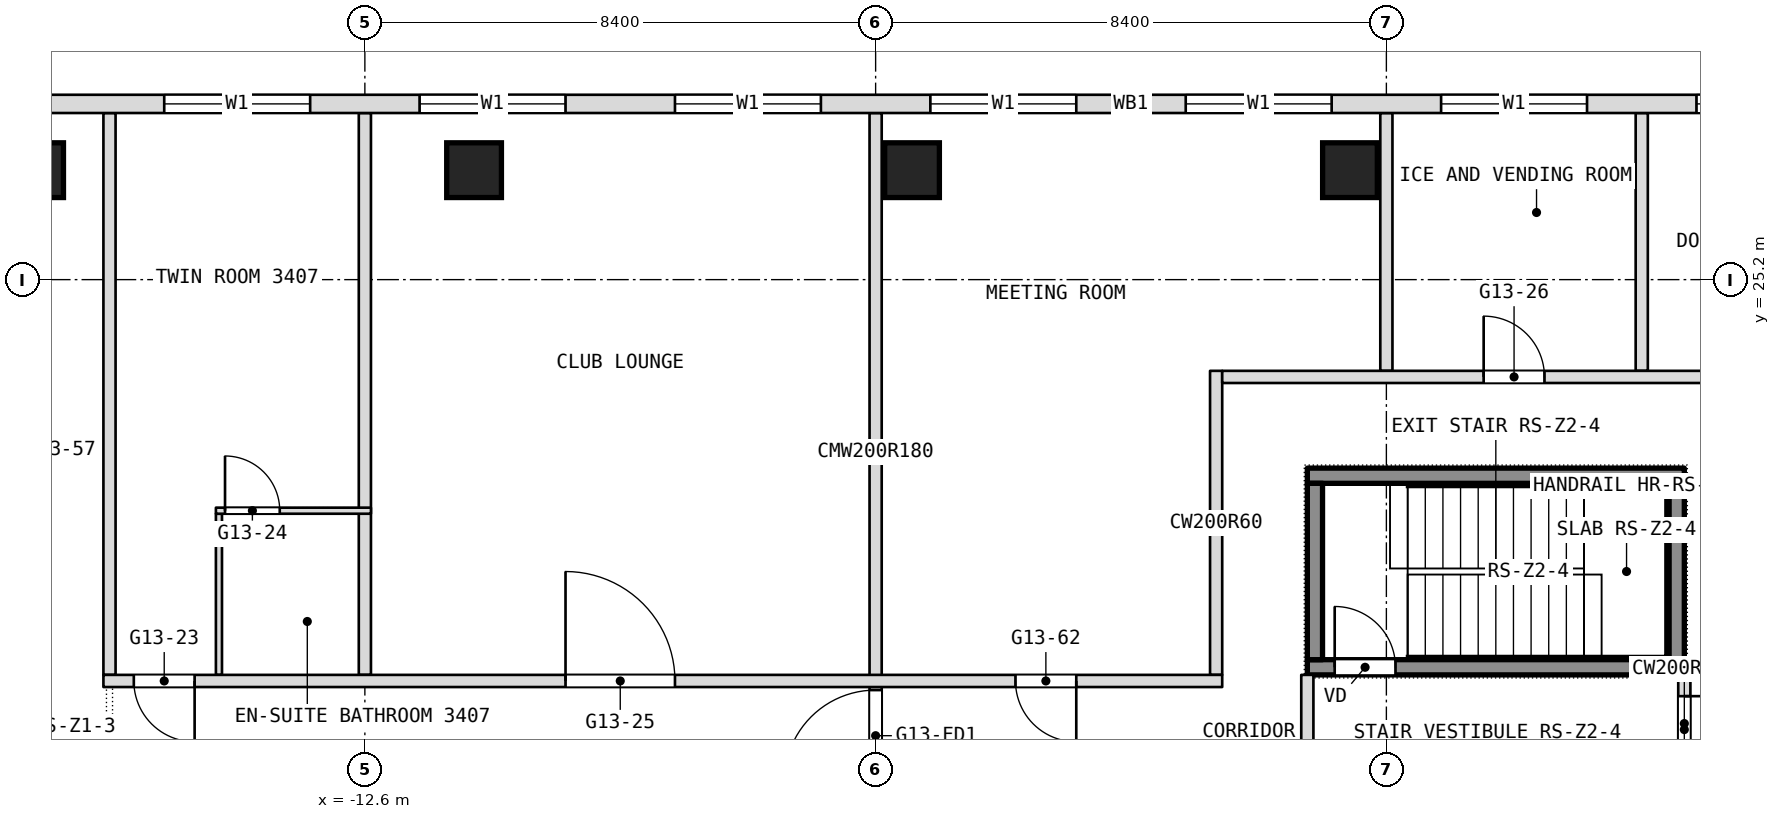
"""IFC4 building model, lengths in metres.
Left out: names, types, materials, properties, quantities, classifications, styles, units other than length and angle.
Written with IfcOpenShell. Run it as: python <this file> out.ifc"""

import sys

from ifc_helpers import new_model, si_unit, direction, frame, frame_2d, origin, origin_2d, place, context, subcontext, project, spatial, rectangle, extrude, element, fill, save


model = new_model("IFC4")
c1 = context("Model", 3, precision=1e-05, world=origin(), true_north=direction((0.0, 1.0)))
c2 = subcontext(c1, "Body", "Model", "MODEL_VIEW")
j1 = project(units=[si_unit("LENGTHUNIT", "METRE"), si_unit("PLANEANGLEUNIT", "RADIAN")], contexts=[c1])
p1 = place(None, origin())
s1 = spatial("IfcSite", under=j1, at=p1, CompositionType="ELEMENT")
p2 = place(p1, origin())
s2 = spatial("IfcBuilding", under=s1, at=p2, CompositionType="ELEMENT")
p3 = place(p2, frame((0.0, 0.0, 148.1)))
s3 = spatial("IfcBuildingStorey", under=s2, at=p3, CompositionType="ELEMENT", Elevation=148.1)
for number, where, z_axis, x_axis in (
    (1, (-18.007, 27.0, 0.0), (0.0, 0.0, 1.0), (1.0, 0.0, 0.0)),
    (2, (-10.804, 27.0, 0.0), (0.0, 0.0, 1.0), (1.0, 0.0, 0.0)),
    (3, (-3.601, 27.0, 0.0), (0.0, 0.0, 1.0), (1.0, 0.0, 0.0)),
    (4, (3.601, 27.0, 0.0), (0.0, 0.0, 1.0), (1.0, 0.0, 0.0)),
):
    element("IfcColumn", number, at=place(p3, frame(where, z_axis=z_axis, x_axis=x_axis)), inside=s3, PredefinedType="COLUMN", context=c2, shape_type="SweptSolid", body=[
        extrude(rectangle(XDim=0.9, YDim=0.9, at=origin_2d()), origin(), (0.0, 0.0, 1.0), 3.6),
    ])
p4 = place(p3, frame((9.1, 16.9, 0.0), z_axis=(0.0, 0.0, 1.0), x_axis=(0.0, 1.0, 0.0)))
e5 = element("IfcWall", 5, at=p4, inside=s3, PredefinedType="PARTITIONING", context=c2, shape_type="SweptSolid", body=[
    extrude(rectangle(XDim=1.8, YDim=0.2, at=frame_2d((0.9, 0.0))), origin(), (0.0, 0.0, 1.0), 3.34),
])
p5 = place(p4, frame((0.55, 0.0, 0.0)))
e6 = element("IfcOpeningElement", 6, at=p5, cuts=e5, PredefinedType="OPENING", context=c2, shape_type="SweptSolid", body=[
    extrude(rectangle(XDim=0.9, YDim=2.1, at=frame_2d((0.45, 1.05))), frame((0.0, 0.1, 0.0), z_axis=(0.0, -1.0, 0.0), x_axis=(1.0, 0.0, 0.0)), (0.0, 0.0, 1.0), 0.2),
])
for number, where, z_axis, x_axis in (
    (7, (8.4, 23.7, 0.0), (0.0, 0.0, 1.0), (0.0, 1.0, 0.0)),
    (8, (4.2, 23.7, 0.0), (0.0, 0.0, 1.0), (0.0, 1.0, 0.0)),
):
    element("IfcWall", number, at=place(p3, frame(where, z_axis=z_axis, x_axis=x_axis)), inside=s3, PredefinedType="PARTITIONING", context=c2, shape_type="SweptSolid", body=[
        extrude(rectangle(XDim=4.24, YDim=0.2, at=frame_2d((2.12, 0.0))), origin(), (0.0, 0.0, 1.0), 3.34),
    ])
p6 = place(p3, frame((2.9, 16.9, 0.0), z_axis=(0.0, 0.0, 1.0), x_axis=(0.0, 1.0, 0.0)))
e9 = element("IfcWall", 9, at=p6, inside=s3, PredefinedType="PARTITIONING", context=c2, shape_type="SweptSolid", body=[
    extrude(rectangle(XDim=1.8, YDim=0.2, at=frame_2d((0.9, 0.0))), origin(), (0.0, 0.0, 1.0), 3.34),
])
p7 = place(p3, frame((1.4, 18.7, 0.0), z_axis=(0.0, 0.0, 1.0), x_axis=(0.0, 1.0, 0.0)))
e10 = element("IfcWall", 10, at=p7, inside=s3, PredefinedType="PARTITIONING", context=c2, shape_type="SweptSolid", body=[
    extrude(rectangle(XDim=5.0, YDim=0.2, at=frame_2d((2.5, 0.0))), origin(), (0.0, 0.0, 1.0), 3.34),
])
p8 = place(p3, frame((-4.2, 16.8, 0.0), z_axis=(0.0, 0.0, 1.0), x_axis=(0.0, 1.0, 0.0)))
e11 = element("IfcWall", 11, at=p8, inside=s3, PredefinedType="PARTITIONING", context=c2, shape_type="SweptSolid", body=[
    extrude(rectangle(XDim=11.14, YDim=0.2, at=frame_2d((5.57, 0.0))), origin(), (0.0, 0.0, 1.0), 3.34),
])
p9 = place(p8, frame((0.15, 0.0, 0.0)))
e12 = element("IfcOpeningElement", 12, at=p9, cuts=e11, PredefinedType="OPENING", context=c2, shape_type="SweptSolid", body=[
    extrude(rectangle(XDim=1.5, YDim=2.1, at=frame_2d((0.75, 1.05))), frame((0.0, 0.1, 0.0), z_axis=(0.0, -1.0, 0.0), x_axis=(1.0, 0.0, 0.0)), (0.0, 0.0, 1.0), 0.2),
])
p10 = place(p3, frame((-12.6, 18.7, 0.0), z_axis=(0.0, 0.0, 1.0), x_axis=(0.0, 1.0, 0.0)))
e13 = element("IfcWall", 13, at=p10, inside=s3, PredefinedType="PARTITIONING", context=c2, shape_type="SweptSolid", body=[
    extrude(rectangle(XDim=9.24, YDim=0.2, at=frame_2d((4.62, 0.0))), origin(), (0.0, 0.0, 1.0), 3.34),
])
p11 = place(p3, frame((-15.0, 18.7, 0.0), z_axis=(0.0, 0.0, 1.0), x_axis=(0.0, 1.0, 0.0)))
e14 = element("IfcWall", 14, at=p11, inside=s3, PredefinedType="PARTITIONING", context=c2, shape_type="SweptSolid", body=[
    extrude(rectangle(XDim=2.65, YDim=0.1, at=frame_2d((1.325, 0.0))), origin(), (0.0, 0.0, 1.0), 3.34),
])
p12 = place(p3, frame((-16.8, 18.7, 0.0), z_axis=(0.0, 0.0, 1.0), x_axis=(0.0, 1.0, 0.0)))
e15 = element("IfcWall", 15, at=p12, inside=s3, PredefinedType="PARTITIONING", context=c2, shape_type="SweptSolid", body=[
    extrude(rectangle(XDim=9.24, YDim=0.2, at=frame_2d((4.62, 0.0))), origin(), (0.0, 0.0, 1.0), 3.34),
])
p13 = place(p3, frame((-16.9, 18.6, 0.0), z_axis=(0.0, 0.0, 1.0), x_axis=(1.0, 0.0, 0.0)))
e16 = element("IfcWall", 16, at=p13, inside=s3, PredefinedType="PARTITIONING", context=c2, shape_type="SweptSolid", body=[
    extrude(rectangle(XDim=18.4, YDim=0.2, at=frame_2d((9.2, 0.0))), origin(), (0.0, 0.0, 1.0), 3.34),
])
p14 = place(p13, frame((0.5, 0.0, 0.0)))
e17 = element("IfcOpeningElement", 17, at=p14, cuts=e16, PredefinedType="OPENING", context=c2, shape_type="SweptSolid", body=[
    extrude(rectangle(XDim=1.0, YDim=2.1, at=frame_2d((0.5, 1.05))), frame((0.0, 0.1, 0.0), z_axis=(0.0, -1.0, 0.0), x_axis=(1.0, 0.0, 0.0)), (0.0, 0.0, 1.0), 0.2),
])
p15 = place(p13, frame((7.6, 0.0, 0.0)))
e18 = element("IfcOpeningElement", 18, at=p15, cuts=e16, PredefinedType="OPENING", context=c2, shape_type="SweptSolid", body=[
    extrude(rectangle(XDim=1.8, YDim=2.1, at=frame_2d((0.9, 1.05))), frame((0.0, 0.1, 0.0), z_axis=(0.0, -1.0, 0.0), x_axis=(1.0, 0.0, 0.0)), (0.0, 0.0, 1.0), 0.2),
])
p16 = place(p13, frame((15.0, 0.0, 0.0)))
e19 = element("IfcOpeningElement", 19, at=p16, cuts=e16, PredefinedType="OPENING", context=c2, shape_type="SweptSolid", body=[
    extrude(rectangle(XDim=1.0, YDim=2.1, at=frame_2d((0.5, 1.05))), frame((0.0, 0.1, 0.0), z_axis=(0.0, -1.0, 0.0), x_axis=(1.0, 0.0, 0.0)), (0.0, 0.0, 1.0), 0.2),
])
p17 = place(p3, frame((-15.05, 21.4, 0.0), z_axis=(0.0, 0.0, 1.0), x_axis=(1.0, 0.0, 0.0)))
e20 = element("IfcWall", 20, at=p17, inside=s3, PredefinedType="PARTITIONING", context=c2, shape_type="SweptSolid", body=[
    extrude(rectangle(XDim=2.55, YDim=0.1, at=frame_2d((1.275, 0.0))), origin(), (0.0, 0.0, 1.0), 3.34),
])
p18 = place(p17, frame((0.15, 0.0, 0.0)))
e21 = element("IfcOpeningElement", 21, at=p18, cuts=e20, PredefinedType="OPENING", context=c2, shape_type="SweptSolid", body=[
    extrude(rectangle(XDim=0.9, YDim=2.1, at=frame_2d((0.45, 1.05))), frame((0.0, 0.05, 0.0), z_axis=(0.0, -1.0, 0.0), x_axis=(1.0, 0.0, 0.0)), (0.0, 0.0, 1.0), 0.1),
])
p19 = place(p3, frame((1.5, 23.6, 0.0), z_axis=(0.0, 0.0, 1.0), x_axis=(1.0, 0.0, 0.0)))
e22 = element("IfcWall", 22, at=p19, inside=s3, PredefinedType="PARTITIONING", context=c2, shape_type="SweptSolid", body=[
    extrude(rectangle(XDim=9.2, YDim=0.2, at=frame_2d((4.6, 0.0))), origin(), (0.0, 0.0, 1.0), 3.34),
])
p20 = place(p19, frame((4.3, 0.0, 0.0)))
e23 = element("IfcOpeningElement", 23, at=p20, cuts=e22, PredefinedType="OPENING", context=c2, shape_type="SweptSolid", body=[
    extrude(rectangle(XDim=1.0, YDim=2.1, at=frame_2d((0.5, 1.05))), frame((0.0, 0.1, 0.0), z_axis=(0.0, -1.0, 0.0), x_axis=(1.0, 0.0, 0.0)), (0.0, 0.0, 1.0), 0.2),
])
p21 = place(p3, frame((21.306, 28.09, 0.0), z_axis=(0.0, 0.0, 1.0), x_axis=(-1.0, 0.0, 0.0)))
e24 = element("IfcWall", 24, at=p21, inside=s3, PredefinedType="NOTDEFINED", context=c2, shape_type="SweptSolid", body=[
    extrude(rectangle(XDim=42.612, YDim=0.3, at=frame_2d((21.306, 0.0))), origin(), (0.0, 0.0, 1.0), 3.6),
])
p22 = place(p21, frame((5.406, 0.0, 0.9)))
e25 = element("IfcOpeningElement", 25, at=p22, cuts=e24, PredefinedType="OPENING", context=c2, shape_type="SweptSolid", body=[
    extrude(rectangle(XDim=2.4, YDim=2.1, at=frame_2d((1.2, 1.05))), frame((0.0, 0.15, 0.0), z_axis=(0.0, -1.0, 0.0), x_axis=(1.0, 0.0, 0.0)), (0.0, 0.0, 1.0), 0.3),
])
p23 = place(p21, frame((9.606, 0.0, 0.9)))
e26 = element("IfcOpeningElement", 26, at=p23, cuts=e24, PredefinedType="OPENING", context=c2, shape_type="SweptSolid", body=[
    extrude(rectangle(XDim=2.4, YDim=2.1, at=frame_2d((1.2, 1.05))), frame((0.0, 0.15, 0.0), z_axis=(0.0, -1.0, 0.0), x_axis=(1.0, 0.0, 0.0)), (0.0, 0.0, 1.0), 0.3),
])
p24 = place(p21, frame((13.806, 0.0, 0.9)))
e27 = element("IfcOpeningElement", 27, at=p24, cuts=e24, PredefinedType="OPENING", context=c2, shape_type="SweptSolid", body=[
    extrude(rectangle(XDim=2.4, YDim=2.1, at=frame_2d((1.2, 1.05))), frame((0.0, 0.15, 0.0), z_axis=(0.0, -1.0, 0.0), x_axis=(1.0, 0.0, 0.0)), (0.0, 0.0, 1.0), 0.3),
])
p25 = place(p21, frame((18.006, 0.0, 0.9)))
e28 = element("IfcOpeningElement", 28, at=p25, cuts=e24, PredefinedType="OPENING", context=c2, shape_type="SweptSolid", body=[
    extrude(rectangle(XDim=2.4, YDim=2.1, at=frame_2d((1.2, 1.05))), frame((0.0, 0.15, 0.0), z_axis=(0.0, -1.0, 0.0), x_axis=(1.0, 0.0, 0.0)), (0.0, 0.0, 1.0), 0.3),
])
p26 = place(p21, frame((22.206, 0.0, 0.9)))
e29 = element("IfcOpeningElement", 29, at=p26, cuts=e24, PredefinedType="OPENING", context=c2, shape_type="SweptSolid", body=[
    extrude(rectangle(XDim=2.4, YDim=2.1, at=frame_2d((1.2, 1.05))), frame((0.0, 0.15, 0.0), z_axis=(0.0, -1.0, 0.0), x_axis=(1.0, 0.0, 0.0)), (0.0, 0.0, 1.0), 0.3),
])
p27 = place(p21, frame((26.406, 0.0, 0.9)))
e30 = element("IfcOpeningElement", 30, at=p27, cuts=e24, PredefinedType="OPENING", context=c2, shape_type="SweptSolid", body=[
    extrude(rectangle(XDim=2.4, YDim=2.1, at=frame_2d((1.2, 1.05))), frame((0.0, 0.15, 0.0), z_axis=(0.0, -1.0, 0.0), x_axis=(1.0, 0.0, 0.0)), (0.0, 0.0, 1.0), 0.3),
])
p28 = place(p21, frame((30.606, 0.0, 0.9)))
e31 = element("IfcOpeningElement", 31, at=p28, cuts=e24, PredefinedType="OPENING", context=c2, shape_type="SweptSolid", body=[
    extrude(rectangle(XDim=2.4, YDim=2.1, at=frame_2d((1.2, 1.05))), frame((0.0, 0.15, 0.0), z_axis=(0.0, -1.0, 0.0), x_axis=(1.0, 0.0, 0.0)), (0.0, 0.0, 1.0), 0.3),
])
p29 = place(p21, frame((34.806, 0.0, 0.9)))
e32 = element("IfcOpeningElement", 32, at=p29, cuts=e24, PredefinedType="OPENING", context=c2, shape_type="SweptSolid", body=[
    extrude(rectangle(XDim=2.4, YDim=2.1, at=frame_2d((1.2, 1.05))), frame((0.0, 0.15, 0.0), z_axis=(0.0, -1.0, 0.0), x_axis=(1.0, 0.0, 0.0)), (0.0, 0.0, 1.0), 0.3),
])
p30 = place(p3, frame((2.9, 18.825, 0.1), z_axis=(0.0, 0.0, 1.0), x_axis=(1.0, 0.0, 0.0)))
e33 = element("IfcWall", 33, at=p30, inside=s3, PredefinedType="SHEAR", context=c2, shape_type="SweptSolid", body=[
    extrude(rectangle(XDim=6.2, YDim=0.25, at=frame_2d((3.1, 0.0))), origin(), (0.0, 0.0, 1.0), 3.6),
])
p31 = place(p30, frame((0.45, 0.0, 0.0)))
e34 = element("IfcOpeningElement", 34, at=p31, cuts=e33, PredefinedType="OPENING", context=c2, shape_type="SweptSolid", body=[
    extrude(rectangle(XDim=1.0, YDim=2.1, at=frame_2d((0.5, 1.05))), frame((0.0, 0.125, 0.0), z_axis=(0.0, -1.0, 0.0), x_axis=(1.0, 0.0, 0.0)), (0.0, 0.0, 1.0), 0.25),
])
p32 = place(p3, frame((2.9, 21.975, 0.1), z_axis=(0.0, 0.0, 1.0), x_axis=(1.0, 0.0, 0.0)))
e35 = element("IfcWall", 35, at=p32, inside=s3, PredefinedType="SHEAR", context=c2, shape_type="SweptSolid", body=[
    extrude(rectangle(XDim=6.2, YDim=0.25, at=frame_2d((3.1, 0.0))), origin(), (0.0, 0.0, 1.0), 3.6),
])
for number, where, z_axis, x_axis in (
    (36, (3.025, 18.95, 0.1), (0.0, 0.0, 1.0), (0.0, 1.0, 0.0)),
    (37, (8.975, 18.95, 0.1), (0.0, 0.0, 1.0), (0.0, 1.0, 0.0)),
):
    element("IfcWall", number, at=place(p3, frame(where, z_axis=z_axis, x_axis=x_axis)), inside=s3, PredefinedType="SHEAR", context=c2, shape_type="SweptSolid", body=[
        extrude(rectangle(XDim=2.9, YDim=0.25, at=frame_2d((1.45, 0.0))), origin(), (0.0, 0.0, 1.0), 3.6),
    ])
p33 = place(p5, origin())
e38 = element("IfcDoor", 38, at=p33, inside=s3, OperationType="SINGLE_SWING_RIGHT", PredefinedType="DOOR", context=c2, shape_type="SweptSolid", body=[
    extrude(rectangle(XDim=0.9, YDim=2.1, at=frame_2d((0.45, 1.05))), frame((0.0, 0.025, 0.0), z_axis=(0.0, -1.0, 0.0), x_axis=(1.0, 0.0, 0.0)), (0.0, 0.0, 1.0), 0.05),
])
fill(e6, e38)
p34 = place(p14, origin())
e39 = element("IfcDoor", 39, at=p34, inside=s3, OperationType="SINGLE_SWING_RIGHT", PredefinedType="DOOR", context=c2, shape_type="SweptSolid", body=[
    extrude(rectangle(XDim=1.0, YDim=2.1, at=frame_2d((0.5, 1.05))), frame((0.0, 0.025, 0.0), z_axis=(0.0, -1.0, 0.0), x_axis=(1.0, 0.0, 0.0)), (0.0, 0.0, 1.0), 0.05),
])
fill(e17, e39)
p35 = place(p15, origin())
e40 = element("IfcDoor", 40, at=p35, inside=s3, OperationType="DOUBLE_DOOR_SINGLE_SWING", PredefinedType="DOOR", context=c2, shape_type="SweptSolid", body=[
    extrude(rectangle(XDim=1.8, YDim=2.1, at=frame_2d((0.9, 1.05))), frame((0.0, 0.025, 0.0), z_axis=(0.0, -1.0, 0.0), x_axis=(1.0, 0.0, 0.0)), (0.0, 0.0, 1.0), 0.05),
])
fill(e18, e40)
p36 = place(p16, origin())
e41 = element("IfcDoor", 41, at=p36, inside=s3, OperationType="SINGLE_SWING_LEFT", PredefinedType="DOOR", context=c2, shape_type="SweptSolid", body=[
    extrude(rectangle(XDim=1.0, YDim=2.1, at=frame_2d((0.5, 1.05))), frame((0.0, 0.025, 0.0), z_axis=(0.0, -1.0, 0.0), x_axis=(1.0, 0.0, 0.0)), (0.0, 0.0, 1.0), 0.05),
])
fill(e19, e41)
p37 = place(p18, origin())
e42 = element("IfcDoor", 42, at=p37, inside=s3, OperationType="SINGLE_SWING_RIGHT", PredefinedType="DOOR", context=c2, shape_type="SweptSolid", body=[
    extrude(rectangle(XDim=0.9, YDim=2.1, at=frame_2d((0.45, 1.05))), frame((0.0, 0.025, 0.0), z_axis=(0.0, -1.0, 0.0), x_axis=(1.0, 0.0, 0.0)), (0.0, 0.0, 1.0), 0.05),
])
fill(e21, e42)
p38 = place(p20, origin())
e43 = element("IfcDoor", 43, at=p38, inside=s3, OperationType="SINGLE_SWING_LEFT", PredefinedType="DOOR", context=c2, shape_type="SweptSolid", body=[
    extrude(rectangle(XDim=1.0, YDim=2.1, at=frame_2d((0.5, 1.05))), frame((0.0, 0.025, 0.0), z_axis=(0.0, -1.0, 0.0), x_axis=(1.0, 0.0, 0.0)), (0.0, 0.0, 1.0), 0.05),
])
fill(e23, e43)
p39 = place(p23, origin())
e44 = element("IfcWindow", 44, at=p39, inside=s3, PartitioningType="SINGLE_PANEL", PredefinedType="WINDOW", context=c2, shape_type="SweptSolid", body=[
    extrude(rectangle(XDim=2.4, YDim=2.1, at=frame_2d((1.2, 1.05))), frame((0.0, 0.03, 0.0), z_axis=(0.0, -1.0, 0.0), x_axis=(1.0, 0.0, 0.0)), (0.0, 0.0, 1.0), 0.06),
])
fill(e26, e44)
p40 = place(p24, origin())
e45 = element("IfcWindow", 45, at=p40, inside=s3, PartitioningType="SINGLE_PANEL", PredefinedType="WINDOW", context=c2, shape_type="SweptSolid", body=[
    extrude(rectangle(XDim=2.4, YDim=2.1, at=frame_2d((1.2, 1.05))), frame((0.0, 0.03, 0.0), z_axis=(0.0, -1.0, 0.0), x_axis=(1.0, 0.0, 0.0)), (0.0, 0.0, 1.0), 0.06),
])
fill(e27, e45)
p41 = place(p25, origin())
e46 = element("IfcWindow", 46, at=p41, inside=s3, PartitioningType="SINGLE_PANEL", PredefinedType="WINDOW", context=c2, shape_type="SweptSolid", body=[
    extrude(rectangle(XDim=2.4, YDim=2.1, at=frame_2d((1.2, 1.05))), frame((0.0, 0.03, 0.0), z_axis=(0.0, -1.0, 0.0), x_axis=(1.0, 0.0, 0.0)), (0.0, 0.0, 1.0), 0.06),
])
fill(e28, e46)
p42 = place(p26, origin())
e47 = element("IfcWindow", 47, at=p42, inside=s3, PartitioningType="SINGLE_PANEL", PredefinedType="WINDOW", context=c2, shape_type="SweptSolid", body=[
    extrude(rectangle(XDim=2.4, YDim=2.1, at=frame_2d((1.2, 1.05))), frame((0.0, 0.03, 0.0), z_axis=(0.0, -1.0, 0.0), x_axis=(1.0, 0.0, 0.0)), (0.0, 0.0, 1.0), 0.06),
])
fill(e29, e47)
p43 = place(p27, origin())
e48 = element("IfcWindow", 48, at=p43, inside=s3, PartitioningType="SINGLE_PANEL", PredefinedType="WINDOW", context=c2, shape_type="SweptSolid", body=[
    extrude(rectangle(XDim=2.4, YDim=2.1, at=frame_2d((1.2, 1.05))), frame((0.0, 0.03, 0.0), z_axis=(0.0, -1.0, 0.0), x_axis=(1.0, 0.0, 0.0)), (0.0, 0.0, 1.0), 0.06),
])
fill(e30, e48)
p44 = place(p28, origin())
e49 = element("IfcWindow", 49, at=p44, inside=s3, PartitioningType="SINGLE_PANEL", PredefinedType="WINDOW", context=c2, shape_type="SweptSolid", body=[
    extrude(rectangle(XDim=2.4, YDim=2.1, at=frame_2d((1.2, 1.05))), frame((0.0, 0.03, 0.0), z_axis=(0.0, -1.0, 0.0), x_axis=(1.0, 0.0, 0.0)), (0.0, 0.0, 1.0), 0.06),
])
fill(e31, e49)
p45 = place(p29, origin())
e50 = element("IfcWindow", 50, at=p45, inside=s3, PartitioningType="SINGLE_PANEL", PredefinedType="WINDOW", context=c2, shape_type="SweptSolid", body=[
    extrude(rectangle(XDim=2.4, YDim=2.1, at=frame_2d((1.2, 1.05))), frame((0.0, 0.03, 0.0), z_axis=(0.0, -1.0, 0.0), x_axis=(1.0, 0.0, 0.0)), (0.0, 0.0, 1.0), 0.06),
])
fill(e32, e50)
p46 = place(p31, origin())
e51 = element("IfcDoor", 51, at=p46, inside=s3, OperationType="SINGLE_SWING_LEFT", PredefinedType="DOOR", context=c2, shape_type="SweptSolid", body=[
    extrude(rectangle(XDim=1.0, YDim=2.1, at=frame_2d((0.5, 1.05))), frame((0.0, 0.025, 0.0), z_axis=(0.0, -1.0, 0.0), x_axis=(1.0, 0.0, 0.0)), (0.0, 0.0, 1.0), 0.05),
])
fill(e34, e51)
p47 = place(p9, origin())
e52 = element("IfcDoor", 52, at=p47, inside=s3, OperationType="DOUBLE_DOOR_DOUBLE_SWING", PredefinedType="DOOR", context=c2, shape_type="SweptSolid", body=[
    extrude(rectangle(XDim=1.5, YDim=2.1, at=frame_2d((0.75, 1.05))), frame((0.0, 0.025, 0.0), z_axis=(0.0, -1.0, 0.0), x_axis=(1.0, 0.0, 0.0)), (0.0, 0.0, 1.0), 0.05),
])
fill(e12, e52)
save(model, sys.argv[1])
